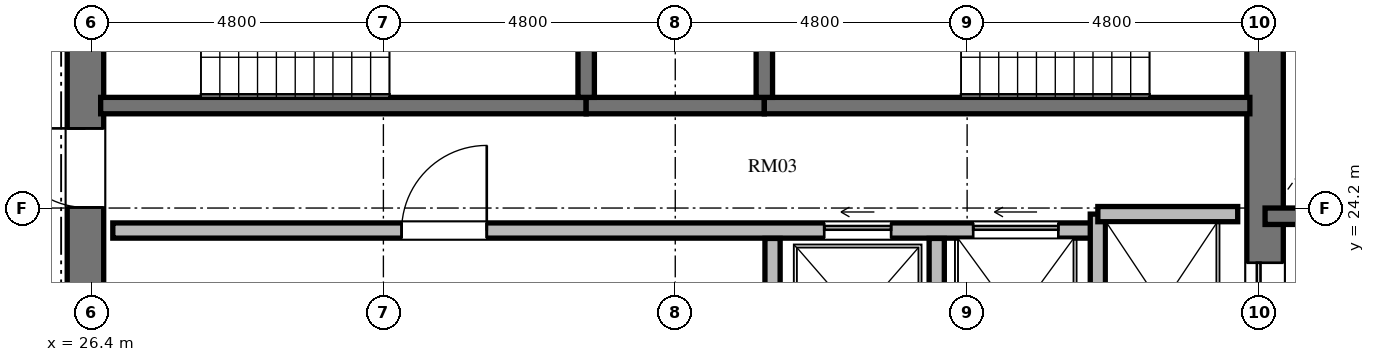
"""IFC4 building model, lengths in metres.
Left out: names, types, materials, properties, quantities, classifications, styles, units other than length and angle.
Written with IfcOpenShell. Run it as: python <this file> out.ifc"""

import sys

from ifc_helpers import new_model, si_unit, direction, frame, frame_2d, origin, place, context, subcontext, project, spatial, rectangle, extrude, element, fill, save


model = new_model("IFC4")
c1 = context("Model", 3, precision=1e-05, world=origin(), true_north=direction((0.0, 1.0)))
c2 = subcontext(c1, "Body", "Model", "MODEL_VIEW")
j1 = project(units=[si_unit("LENGTHUNIT", "METRE"), si_unit("PLANEANGLEUNIT", "RADIAN")], contexts=[c1])
p1 = place(None, origin())
s1 = spatial("IfcSite", under=j1, at=p1, CompositionType="ELEMENT")
p2 = place(p1, origin())
s2 = spatial("IfcBuilding", under=s1, at=p2, CompositionType="ELEMENT")
p3 = place(p2, frame((0.0, 0.0, 216.72)))
s3 = spatial("IfcBuildingStorey", under=s2, at=p3, CompositionType="ELEMENT", Elevation=216.72)
p4 = place(p3, frame((26.3, 20.95, 0.0), z_axis=(0.0, 0.0, 1.0), x_axis=(0.0, 1.0, 0.0)))
e1 = element("IfcWall", 1, at=p4, inside=s3, PredefinedType="SHEAR", context=c2, shape_type="SweptSolid", body=[
    extrude(rectangle(XDim=14.1, YDim=0.6, at=frame_2d((7.05, 0.0))), origin(), (0.0, 0.0, 1.0), 3.648),
])
p5 = place(p4, frame((6.5, 0.0, 0.0)))
e2 = element("IfcOpeningElement", 2, at=p5, cuts=e1, PredefinedType="OPENING", context=c2, shape_type="SweptSolid", body=[
    extrude(rectangle(XDim=1.2, YDim=2.15, at=frame_2d((0.6, 1.075))), frame((0.0, 0.31, 0.0), z_axis=(0.0, -1.0, 0.0), x_axis=(1.0, 0.0, 0.0)), (0.0, 0.0, 1.0), 0.62),
])
p6 = place(p4, frame((9.6, 0.0, 0.0)))
e3 = element("IfcOpeningElement", 3, at=p6, cuts=e1, PredefinedType="OPENING", context=c2, shape_type="SweptSolid", body=[
    extrude(rectangle(XDim=1.3, YDim=2.2, at=frame_2d((0.65, 1.1))), frame((0.0, 0.31, 0.0), z_axis=(0.0, -1.0, 0.0), x_axis=(1.0, 0.0, 0.0)), (0.0, 0.0, 1.0), 0.62),
])
p7 = place(p4, frame((3.26, 0.0, 0.0)))
e4 = element("IfcOpeningElement", 4, at=p7, cuts=e1, PredefinedType="OPENING", context=c2, shape_type="SweptSolid", body=[
    extrude(rectangle(XDim=1.3, YDim=2.2, at=frame_2d((0.65, 1.1))), frame((0.0, 0.31, 0.0), z_axis=(0.0, -1.0, 0.0), x_axis=(1.0, 0.0, 0.0)), (0.0, 0.0, 1.0), 0.62),
])
p8 = place(p3, frame((45.7, 20.95, 0.0), z_axis=(0.0, 0.0, 1.0), x_axis=(0.0, 1.0, 0.0)))
e5 = element("IfcWall", 5, at=p8, inside=s3, PredefinedType="SHEAR", context=c2, shape_type="SweptSolid", body=[
    extrude(rectangle(XDim=14.1, YDim=0.6, at=frame_2d((7.05, 0.0))), origin(), (0.0, 0.0, 1.0), 3.648),
])
p9 = place(p8, frame((11.75, 0.0, 0.0)))
e6 = element("IfcOpeningElement", 6, at=p9, cuts=e5, PredefinedType="OPENING", context=c2, shape_type="SweptSolid", body=[
    extrude(rectangle(XDim=1.4, YDim=2.3, at=frame_2d((0.7, 1.15))), frame((0.0, 0.31, 0.0), z_axis=(0.0, -1.0, 0.0), x_axis=(1.0, 0.0, 0.0)), (0.0, 0.0, 1.0), 0.62),
])
p10 = place(p8, frame((0.95, 0.0, 0.0)))
e7 = element("IfcOpeningElement", 7, at=p10, cuts=e5, PredefinedType="OPENING", context=c2, shape_type="SweptSolid", body=[
    extrude(rectangle(XDim=1.4, YDim=2.3, at=frame_2d((0.7, 1.15))), frame((0.0, 0.31, 0.0), z_axis=(0.0, -1.0, 0.0), x_axis=(1.0, 0.0, 0.0)), (0.0, 0.0, 1.0), 0.62),
])
p11 = place(p3, frame((26.55, 25.885, 0.0), z_axis=(0.0, 0.0, 1.0), x_axis=(1.0, 0.0, 0.0)))
e8 = element("IfcWall", 8, at=p11, inside=s3, PredefinedType="SHEAR", context=c2, shape_type="SweptSolid", body=[
    extrude(rectangle(XDim=7.985, YDim=0.27, at=frame_2d((3.992, 0.0))), origin(), (0.0, 0.0, 1.0), 3.648),
])
p12 = place(p3, frame((34.535, 25.885, 0.0), z_axis=(0.0, 0.0, 1.0), x_axis=(1.0, 0.0, 0.0)))
e9 = element("IfcWall", 9, at=p12, inside=s3, PredefinedType="SHEAR", context=c2, shape_type="SweptSolid", body=[
    extrude(rectangle(XDim=2.93, YDim=0.27, at=frame_2d((1.465, 0.0))), origin(), (0.0, 0.0, 1.0), 3.648),
])
p13 = place(p3, frame((37.465, 25.885, 0.0), z_axis=(0.0, 0.0, 1.0), x_axis=(1.0, 0.0, 0.0)))
e10 = element("IfcWall", 10, at=p13, inside=s3, PredefinedType="SHEAR", context=c2, shape_type="SweptSolid", body=[
    extrude(rectangle(XDim=7.985, YDim=0.27, at=frame_2d((3.992, 0.0))), origin(), (0.0, 0.0, 1.0), 3.648),
])
for number, where, z_axis, x_axis in (
    (11, (34.535, 26.02, 0.0), (0.0, 0.0, 1.0), (0.0, 1.0, 0.0)),
    (12, (37.465, 26.02, 0.0), (0.0, 0.0, 1.0), (0.0, 1.0, 0.0)),
):
    element("IfcWall", number, at=place(p3, frame(where, z_axis=z_axis, x_axis=x_axis)), inside=s3, PredefinedType="SHEAR", context=c2, shape_type="SweptSolid", body=[
        extrude(rectangle(XDim=4.08, YDim=0.27, at=frame_2d((2.04, 0.0))), origin(), (0.0, 0.0, 1.0), 3.648),
    ])
p14 = place(p3, frame((26.75, 23.83, 0.0), z_axis=(0.0, 0.0, 1.0), x_axis=(1.0, 0.0, 0.0)))
e13 = element("IfcWall", 13, at=p14, inside=s3, PredefinedType="SOLIDWALL", context=c2, shape_type="SweptSolid", body=[
    extrude(rectangle(XDim=16.2, YDim=0.25, at=frame_2d((8.1, 0.0))), origin(), (0.0, 0.0, 1.0), 3.448),
])
p15 = place(p14, frame((4.75, 0.0, 0.0)))
e14 = element("IfcOpeningElement", 14, at=p15, cuts=e13, PredefinedType="OPENING", context=c2, shape_type="SweptSolid", body=[
    extrude(rectangle(XDim=1.4, YDim=2.2, at=frame_2d((0.7, 1.1))), frame((0.0, 0.135, 0.0), z_axis=(0.0, -1.0, 0.0), x_axis=(1.0, 0.0, 0.0)), (0.0, 0.0, 1.0), 0.27),
])
p16 = place(p14, frame((11.7, 0.0, 0.0)))
e15 = element("IfcOpeningElement", 15, at=p16, cuts=e13, PredefinedType="OPENING", context=c2, shape_type="SweptSolid", body=[
    extrude(rectangle(XDim=1.1, YDim=2.2, at=frame_2d((0.55, 1.1))), frame((0.0, 0.135, 0.0), z_axis=(0.0, -1.0, 0.0), x_axis=(1.0, 0.0, 0.0)), (0.0, 0.0, 1.0), 0.27),
])
p17 = place(p14, frame((14.15, 0.0, 0.0)))
e16 = element("IfcOpeningElement", 16, at=p17, cuts=e13, PredefinedType="OPENING", context=c2, shape_type="SweptSolid", body=[
    extrude(rectangle(XDim=1.4, YDim=2.3, at=frame_2d((0.7, 1.15))), frame((0.0, 0.135, 0.0), z_axis=(0.0, -1.0, 0.0), x_axis=(1.0, 0.0, 0.0)), (0.0, 0.0, 1.0), 0.27),
])
p18 = place(p3, frame((42.95, 20.9, 0.0), z_axis=(0.0, 0.0, 1.0), x_axis=(0.0, 1.0, 0.0)))
e17 = element("IfcWall", 17, at=p18, inside=s3, PredefinedType="SOLIDWALL", context=c2, shape_type="SweptSolid", body=[
    extrude(rectangle(XDim=3.2, YDim=0.25, at=frame_2d((1.6, 0.0))), origin(), (0.0, 0.0, 1.0), 3.448),
])
p19 = place(p3, frame((42.95, 24.1, 0.0), z_axis=(0.0, 0.0, 1.0), x_axis=(1.0, 0.0, 0.0)))
e18 = element("IfcWall", 18, at=p19, inside=s3, PredefinedType="SOLIDWALL", context=c2, shape_type="SweptSolid", body=[
    extrude(rectangle(XDim=2.3, YDim=0.25, at=frame_2d((1.15, 0.0))), origin(), (0.0, 0.0, 1.0), 3.448),
])
for number, where, z_axis, x_axis in (
    (19, (37.6, 20.9, 0.0), (0.0, 0.0, 1.0), (0.0, 1.0, 0.0)),
    (20, (40.3, 20.9, 0.0), (0.0, 0.0, 1.0), (0.0, 1.0, 0.0)),
):
    element("IfcWall", number, at=place(p3, frame(where, z_axis=z_axis, x_axis=x_axis)), inside=s3, PredefinedType="SOLIDWALL", context=c2, shape_type="SweptSolid", body=[
        extrude(rectangle(XDim=2.8, YDim=0.25, at=frame_2d((1.4, 0.0))), origin(), (0.0, 0.0, 1.0), 3.448),
    ])
p20 = place(p3, frame((45.7, 24.065, 0.0), z_axis=(0.0, 0.0, 1.0), x_axis=(1.0, 0.0, 0.0)))
e21 = element("IfcWall", 21, at=p20, inside=s3, PredefinedType="SHEAR", context=c2, shape_type="SweptSolid", body=[
    extrude(rectangle(XDim=4.715, YDim=0.27, at=frame_2d((2.357, 0.0))), origin(), (0.0, 0.0, 1.0), 3.648),
])
p21 = place(p7, origin())
e22 = element("IfcDoor", 22, at=p21, inside=s3, OperationType="SINGLE_SWING_RIGHT", PredefinedType="DOOR", context=c2, shape_type="SweptSolid", body=[
    extrude(rectangle(XDim=1.3, YDim=2.2, at=frame_2d((0.65, 1.1))), frame((0.0, 0.025, 0.0), z_axis=(0.0, -1.0, 0.0), x_axis=(1.0, 0.0, 0.0)), (0.0, 0.0, 1.0), 0.05),
])
fill(e4, e22)
p22 = place(p15, origin())
e23 = element("IfcDoor", 23, at=p22, inside=s3, OperationType="SINGLE_SWING_RIGHT", PredefinedType="DOOR", context=c2, shape_type="SweptSolid", body=[
    extrude(rectangle(XDim=1.4, YDim=2.2, at=frame_2d((0.7, 1.1))), frame((0.0, 0.025, 0.0), z_axis=(0.0, -1.0, 0.0), x_axis=(1.0, 0.0, 0.0)), (0.0, 0.0, 1.0), 0.05),
])
fill(e14, e23)
p23 = place(p16, origin())
e24 = element("IfcDoor", 24, at=p23, inside=s3, OperationType="SLIDING_TO_LEFT", PredefinedType="DOOR", context=c2, shape_type="SweptSolid", body=[
    extrude(rectangle(XDim=1.1, YDim=2.2, at=frame_2d((0.55, 1.1))), frame((0.0, 0.025, 0.0), z_axis=(0.0, -1.0, 0.0), x_axis=(1.0, 0.0, 0.0)), (0.0, 0.0, 1.0), 0.05),
])
fill(e15, e24)
p24 = place(p10, origin())
e25 = element("IfcDoor", 25, at=p24, inside=s3, OperationType="SLIDING_TO_LEFT", PredefinedType="DOOR", context=c2, shape_type="SweptSolid", body=[
    extrude(rectangle(XDim=1.4, YDim=2.3, at=frame_2d((0.7, 1.15))), frame((0.0, 0.025, 0.0), z_axis=(0.0, -1.0, 0.0), x_axis=(1.0, 0.0, 0.0)), (0.0, 0.0, 1.0), 0.05),
])
fill(e7, e25)
p25 = place(p17, origin())
e26 = element("IfcDoor", 26, at=p25, inside=s3, OperationType="SLIDING_TO_LEFT", PredefinedType="DOOR", context=c2, shape_type="SweptSolid", body=[
    extrude(rectangle(XDim=1.4, YDim=2.3, at=frame_2d((0.7, 1.15))), frame((0.0, 0.025, 0.0), z_axis=(0.0, -1.0, 0.0), x_axis=(1.0, 0.0, 0.0)), (0.0, 0.0, 1.0), 0.05),
])
fill(e16, e26)
save(model, sys.argv[1])
